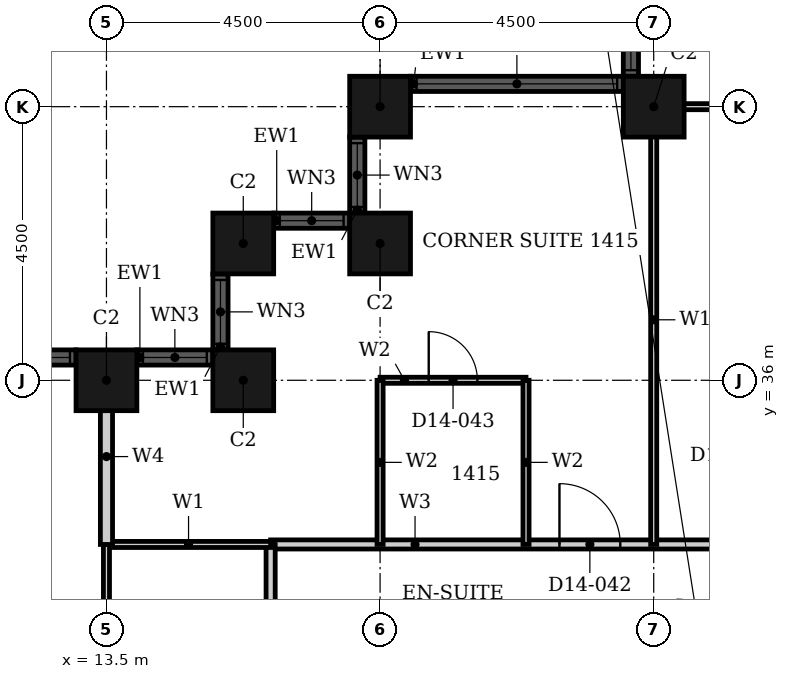
"""IFC4 building model, lengths in metres.
Left out: names, types, materials, properties, quantities, classifications, styles, units other than length and angle.
Written with IfcOpenShell. Run it as: python <this file> out.ifc"""

import sys

from ifc_helpers import new_model, si_unit, direction, frame, frame_2d, origin, origin_2d, place, context, subcontext, project, spatial, rectangle, hollow_rectangle, extrude, element, fill, save


model = new_model("IFC4")
c1 = context("Model", 3, precision=1e-05, world=origin(), true_north=direction((0.0, 1.0)))
c2 = subcontext(c1, "Body", "Model", "MODEL_VIEW")
j1 = project(units=[si_unit("LENGTHUNIT", "METRE"), si_unit("PLANEANGLEUNIT", "RADIAN")], contexts=[c1])
p1 = place(None, origin())
s1 = spatial("IfcSite", under=j1, at=p1, CompositionType="ELEMENT")
p2 = place(p1, origin())
s2 = spatial("IfcBuilding", under=s1, at=p2, CompositionType="ELEMENT")
p3 = place(p2, frame((0.0, 0.0, 63.6)))
s3 = spatial("IfcBuildingStorey", under=s2, at=p3, CompositionType="ELEMENT", Elevation=63.6)
for number, where, z_axis, x_axis in (
    (1, (22.5, 40.5, 0.0), (0.0, 0.0, 1.0), (1.0, 0.0, 0.0)),
    (2, (18.0, 40.5, 0.0), (0.0, 0.0, 1.0), (1.0, 0.0, 0.0)),
    (3, (18.0, 38.25, 0.0), (0.0, 0.0, 1.0), (1.0, 0.0, 0.0)),
    (4, (15.75, 38.25, 0.0), (0.0, 0.0, 1.0), (1.0, 0.0, 0.0)),
    (5, (15.75, 36.0, 0.0), (0.0, 0.0, 1.0), (1.0, 0.0, 0.0)),
    (6, (13.5, 36.0, 0.0), (0.0, 0.0, 1.0), (1.0, 0.0, 0.0)),
):
    element("IfcColumn", number, at=place(p3, frame(where, z_axis=z_axis, x_axis=x_axis)), inside=s3, PredefinedType="COLUMN", context=c2, shape_type="SweptSolid", body=[
        extrude(hollow_rectangle(XDim=1.0, YDim=1.0, WallThickness=0.032, at=origin_2d()), origin(), (0.0, 0.0, 1.0), 3.6),
    ])
p4 = place(p3, frame((22.125, 49.0, 0.0), z_axis=(0.0, 0.0, 1.0), x_axis=(0.0, -1.0, 0.0)))
e7 = element("IfcWall", 7, at=p4, inside=s3, PredefinedType="SOLIDWALL", context=c2, shape_type="SweptSolid", body=[
    extrude(rectangle(XDim=8.0, YDim=0.25, at=frame_2d((4.0, 0.0))), origin(), (0.0, 0.0, 1.0), 3.6),
])
p5 = place(p4, frame((0.1, 0.0, 0.9)))
e8 = element("IfcOpeningElement", 8, at=p5, cuts=e7, PredefinedType="OPENING", context=c2, shape_type="SweptSolid", body=[
    extrude(rectangle(XDim=3.3, YDim=2.08, at=frame_2d((1.65, 1.04))), frame((0.0, 0.135, 0.0), z_axis=(0.0, -1.0, 0.0), x_axis=(1.0, 0.0, 0.0)), (0.0, 0.0, 1.0), 0.27),
])
p6 = place(p4, frame((4.6, 0.0, 0.9)))
e9 = element("IfcOpeningElement", 9, at=p6, cuts=e7, PredefinedType="OPENING", context=c2, shape_type="SweptSolid", body=[
    extrude(rectangle(XDim=3.3, YDim=2.08, at=frame_2d((1.65, 1.04))), frame((0.0, 0.135, 0.0), z_axis=(0.0, -1.0, 0.0), x_axis=(1.0, 0.0, 0.0)), (0.0, 0.0, 1.0), 0.27),
])
p7 = place(p3, frame((22.0, 40.875, 0.0), z_axis=(0.0, 0.0, 1.0), x_axis=(-1.0, 0.0, 0.0)))
e10 = element("IfcWall", 10, at=p7, inside=s3, PredefinedType="SOLIDWALL", context=c2, shape_type="SweptSolid", body=[
    extrude(rectangle(XDim=3.5, YDim=0.25, at=frame_2d((1.75, 0.0))), origin(), (0.0, 0.0, 1.0), 3.6),
])
p8 = place(p7, frame((0.1, 0.0, 0.9)))
e11 = element("IfcOpeningElement", 11, at=p8, cuts=e10, PredefinedType="OPENING", context=c2, shape_type="SweptSolid", body=[
    extrude(rectangle(XDim=3.3, YDim=2.08, at=frame_2d((1.65, 1.04))), frame((0.0, 0.135, 0.0), z_axis=(0.0, -1.0, 0.0), x_axis=(1.0, 0.0, 0.0)), (0.0, 0.0, 1.0), 0.27),
])
p9 = place(p3, frame((17.625, 40.0, 0.0), z_axis=(0.0, 0.0, 1.0), x_axis=(0.0, -1.0, 0.0)))
e12 = element("IfcWall", 12, at=p9, inside=s3, PredefinedType="SOLIDWALL", context=c2, shape_type="SweptSolid", body=[
    extrude(rectangle(XDim=1.25, YDim=0.25, at=frame_2d((0.625, 0.0))), origin(), (0.0, 0.0, 1.0), 3.6),
])
p10 = place(p9, frame((0.1, 0.0, 0.9)))
e13 = element("IfcOpeningElement", 13, at=p10, cuts=e12, PredefinedType="OPENING", context=c2, shape_type="SweptSolid", body=[
    extrude(rectangle(XDim=1.05, YDim=2.08, at=frame_2d((0.525, 1.04))), frame((0.0, 0.135, 0.0), z_axis=(0.0, -1.0, 0.0), x_axis=(1.0, 0.0, 0.0)), (0.0, 0.0, 1.0), 0.27),
])
p11 = place(p3, frame((17.5, 38.625, 0.0), z_axis=(0.0, 0.0, 1.0), x_axis=(-1.0, 0.0, 0.0)))
e14 = element("IfcWall", 14, at=p11, inside=s3, PredefinedType="SOLIDWALL", context=c2, shape_type="SweptSolid", body=[
    extrude(rectangle(XDim=1.25, YDim=0.25, at=frame_2d((0.625, 0.0))), origin(), (0.0, 0.0, 1.0), 3.6),
])
p12 = place(p11, frame((0.1, 0.0, 0.9)))
e15 = element("IfcOpeningElement", 15, at=p12, cuts=e14, PredefinedType="OPENING", context=c2, shape_type="SweptSolid", body=[
    extrude(rectangle(XDim=1.05, YDim=2.08, at=frame_2d((0.525, 1.04))), frame((0.0, 0.135, 0.0), z_axis=(0.0, -1.0, 0.0), x_axis=(1.0, 0.0, 0.0)), (0.0, 0.0, 1.0), 0.27),
])
p13 = place(p3, frame((15.375, 37.75, 0.0), z_axis=(0.0, 0.0, 1.0), x_axis=(0.0, -1.0, 0.0)))
e16 = element("IfcWall", 16, at=p13, inside=s3, PredefinedType="SOLIDWALL", context=c2, shape_type="SweptSolid", body=[
    extrude(rectangle(XDim=1.25, YDim=0.25, at=frame_2d((0.625, 0.0))), origin(), (0.0, 0.0, 1.0), 3.6),
])
p14 = place(p13, frame((0.1, 0.0, 0.9)))
e17 = element("IfcOpeningElement", 17, at=p14, cuts=e16, PredefinedType="OPENING", context=c2, shape_type="SweptSolid", body=[
    extrude(rectangle(XDim=1.05, YDim=2.08, at=frame_2d((0.525, 1.04))), frame((0.0, 0.135, 0.0), z_axis=(0.0, -1.0, 0.0), x_axis=(1.0, 0.0, 0.0)), (0.0, 0.0, 1.0), 0.27),
])
p15 = place(p3, frame((15.25, 36.375, 0.0), z_axis=(0.0, 0.0, 1.0), x_axis=(-1.0, 0.0, 0.0)))
e18 = element("IfcWall", 18, at=p15, inside=s3, PredefinedType="SOLIDWALL", context=c2, shape_type="SweptSolid", body=[
    extrude(rectangle(XDim=1.25, YDim=0.25, at=frame_2d((0.625, 0.0))), origin(), (0.0, 0.0, 1.0), 3.6),
])
p16 = place(p15, frame((0.1, 0.0, 0.9)))
e19 = element("IfcOpeningElement", 19, at=p16, cuts=e18, PredefinedType="OPENING", context=c2, shape_type="SweptSolid", body=[
    extrude(rectangle(XDim=1.05, YDim=2.08, at=frame_2d((0.525, 1.04))), frame((0.0, 0.135, 0.0), z_axis=(0.0, -1.0, 0.0), x_axis=(1.0, 0.0, 0.0)), (0.0, 0.0, 1.0), 0.27),
])
p17 = place(p3, frame((13.0, 36.375, 0.0), z_axis=(0.0, 0.0, 1.0), x_axis=(-1.0, 0.0, 0.0)))
e20 = element("IfcWall", 20, at=p17, inside=s3, PredefinedType="SOLIDWALL", context=c2, shape_type="SweptSolid", body=[
    extrude(rectangle(XDim=8.0, YDim=0.25, at=frame_2d((4.0, 0.0))), origin(), (0.0, 0.0, 1.0), 3.6),
])
p18 = place(p17, frame((0.1, 0.0, 0.9)))
e21 = element("IfcOpeningElement", 21, at=p18, cuts=e20, PredefinedType="OPENING", context=c2, shape_type="SweptSolid", body=[
    extrude(rectangle(XDim=3.3, YDim=2.08, at=frame_2d((1.65, 1.04))), frame((0.0, 0.135, 0.0), z_axis=(0.0, -1.0, 0.0), x_axis=(1.0, 0.0, 0.0)), (0.0, 0.0, 1.0), 0.27),
])
p19 = place(p17, frame((4.6, 0.0, 0.9)))
e22 = element("IfcOpeningElement", 22, at=p19, cuts=e20, PredefinedType="OPENING", context=c2, shape_type="SweptSolid", body=[
    extrude(rectangle(XDim=3.3, YDim=2.08, at=frame_2d((1.65, 1.04))), frame((0.0, 0.135, 0.0), z_axis=(0.0, -1.0, 0.0), x_axis=(1.0, 0.0, 0.0)), (0.0, 0.0, 1.0), 0.27),
])
p20 = place(p3, frame((16.2, 33.3, 0.0), z_axis=(0.0, 0.0, 1.0), x_axis=(1.0, 0.0, 0.0)))
e23 = element("IfcWall", 23, at=p20, inside=s3, PredefinedType="PARTITIONING", context=c2, shape_type="SweptSolid", body=[
    extrude(rectangle(XDim=9.9, YDim=0.15, at=frame_2d((4.95, 0.0))), origin(), (0.0, 0.0, 1.0), 3.3),
])
p21 = place(p20, frame((4.75, 0.0, 0.0)))
e24 = element("IfcOpeningElement", 24, at=p21, cuts=e23, PredefinedType="OPENING", context=c2, shape_type="SweptSolid", body=[
    extrude(rectangle(XDim=1.0, YDim=2.1, at=frame_2d((0.5, 1.05))), frame((0.0, 0.085, 0.0), z_axis=(0.0, -1.0, 0.0), x_axis=(1.0, 0.0, 0.0)), (0.0, 0.0, 1.0), 0.17),
])
p22 = place(p20, frame((7.65, 0.0, 0.0)))
e25 = element("IfcOpeningElement", 25, at=p22, cuts=e23, PredefinedType="OPENING", context=c2, shape_type="SweptSolid", body=[
    extrude(rectangle(XDim=0.9, YDim=2.1, at=frame_2d((0.45, 1.05))), frame((0.0, 0.085, 0.0), z_axis=(0.0, -1.0, 0.0), x_axis=(1.0, 0.0, 0.0)), (0.0, 0.0, 1.0), 0.17),
])
p23 = place(p3, frame((16.2, 27.0, 0.0), z_axis=(0.0, 0.0, 1.0), x_axis=(0.0, 1.0, 0.0)))
e26 = element("IfcWall", 26, at=p23, inside=s3, PredefinedType="PARTITIONING", context=c2, shape_type="SweptSolid", body=[
    extrude(rectangle(XDim=6.3, YDim=0.15, at=frame_2d((3.15, 0.0))), origin(), (0.0, 0.0, 1.0), 3.3),
])
p24 = place(p23, frame((2.55, 0.0, 0.0)))
e27 = element("IfcOpeningElement", 27, at=p24, cuts=e26, PredefinedType="OPENING", context=c2, shape_type="SweptSolid", body=[
    extrude(rectangle(XDim=0.9, YDim=2.1, at=frame_2d((0.45, 1.05))), frame((0.0, 0.085, 0.0), z_axis=(0.0, -1.0, 0.0), x_axis=(1.0, 0.0, 0.0)), (0.0, 0.0, 1.0), 0.17),
])
p25 = place(p3, frame((13.5, 33.3, 0.0), z_axis=(0.0, 0.0, 1.0), x_axis=(1.0, 0.0, 0.0)))
e28 = element("IfcWall", 28, at=p25, inside=s3, PredefinedType="PARTITIONING", context=c2, shape_type="SweptSolid", body=[
    extrude(rectangle(XDim=2.7, YDim=0.1, at=frame_2d((1.35, 0.0))), origin(), (0.0, 0.0, 1.0), 3.3),
])
p26 = place(p3, frame((22.31, 40.5, 0.0), z_axis=(0.0, 0.0, 1.0), x_axis=(1.0, 0.0, 0.0)))
e29 = element("IfcWall", 29, at=p26, inside=s3, PredefinedType="PARTITIONING", context=c2, shape_type="SweptSolid", body=[
    extrude(rectangle(XDim=3.79, YDim=0.1, at=frame_2d((1.895, 0.0))), origin(), (0.0, 0.0, 1.0), 2.38),
])
p27 = place(p3, frame((13.5, 27.0, 0.0), z_axis=(0.0, 0.0, 1.0), x_axis=(0.0, 1.0, 0.0)))
e30 = element("IfcWall", 30, at=p27, inside=s3, PredefinedType="PARTITIONING", context=c2, shape_type="SweptSolid", body=[
    extrude(rectangle(XDim=6.3, YDim=0.1, at=frame_2d((3.15, 0.0))), origin(), (0.0, 0.0, 1.0), 2.38),
])
p28 = place(p3, frame((22.5, 33.3, 0.0), z_axis=(0.0, 0.0, 1.0), x_axis=(0.0, 1.0, 0.0)))
e31 = element("IfcWall", 31, at=p28, inside=s3, PredefinedType="PARTITIONING", context=c2, shape_type="SweptSolid", body=[
    extrude(rectangle(XDim=7.39, YDim=0.1, at=frame_2d((3.695, 0.0))), origin(), (0.0, 0.0, 1.0), 3.3),
])
p29 = place(p3, frame((13.5, 33.3, 0.0), z_axis=(0.0, 0.0, 1.0), x_axis=(0.0, 1.0, 0.0)))
e32 = element("IfcWall", 32, at=p29, inside=s3, PredefinedType="PARTITIONING", context=c2, shape_type="SweptSolid", body=[
    extrude(rectangle(XDim=2.89, YDim=0.2, at=frame_2d((1.445, 0.0))), origin(), (0.0, 0.0, 1.0), 2.38),
])
p30 = place(p3, frame((18.0, 36.0, 0.0), z_axis=(0.0, 0.0, 1.0), x_axis=(1.0, 0.0, 0.0)))
e33 = element("IfcWall", 33, at=p30, inside=s3, PredefinedType="PARTITIONING", context=c2, shape_type="SweptSolid", body=[
    extrude(rectangle(XDim=2.4, YDim=0.1, at=frame_2d((1.2, 0.0))), origin(), (0.0, 0.0, 1.0), 3.3),
])
p31 = place(p30, frame((0.8, 0.0, 0.0)))
e34 = element("IfcOpeningElement", 34, at=p31, cuts=e33, PredefinedType="OPENING", context=c2, shape_type="SweptSolid", body=[
    extrude(rectangle(XDim=0.8, YDim=2.1, at=frame_2d((0.4, 1.05))), frame((0.0, 0.06, 0.0), z_axis=(0.0, -1.0, 0.0), x_axis=(1.0, 0.0, 0.0)), (0.0, 0.0, 1.0), 0.12),
])
for number, where, z_axis, x_axis in (
    (35, (18.0, 33.3, 0.0), (0.0, 0.0, 1.0), (0.0, 1.0, 0.0)),
    (36, (20.4, 33.3, 0.0), (0.0, 0.0, 1.0), (0.0, 1.0, 0.0)),
):
    element("IfcWall", number, at=place(p3, frame(where, z_axis=z_axis, x_axis=x_axis)), inside=s3, PredefinedType="PARTITIONING", context=c2, shape_type="SweptSolid", body=[
        extrude(rectangle(XDim=2.7, YDim=0.1, at=frame_2d((1.35, 0.0))), origin(), (0.0, 0.0, 1.0), 3.3),
    ])
p32 = place(p6, origin())
e37 = element("IfcWindow", 37, at=p32, inside=s3, PartitioningType="SINGLE_PANEL", PredefinedType="WINDOW", context=c2, shape_type="SweptSolid", body=[
    extrude(rectangle(XDim=3.3, YDim=2.08, at=frame_2d((1.65, 1.04))), frame((0.0, 0.03, 0.0), z_axis=(0.0, -1.0, 0.0), x_axis=(1.0, 0.0, 0.0)), (0.0, 0.0, 1.0), 0.06),
])
fill(e9, e37)
p33 = place(p8, origin())
e38 = element("IfcWindow", 38, at=p33, inside=s3, PartitioningType="SINGLE_PANEL", PredefinedType="WINDOW", context=c2, shape_type="SweptSolid", body=[
    extrude(rectangle(XDim=3.3, YDim=2.08, at=frame_2d((1.65, 1.04))), frame((0.0, 0.03, 0.0), z_axis=(0.0, -1.0, 0.0), x_axis=(1.0, 0.0, 0.0)), (0.0, 0.0, 1.0), 0.06),
])
fill(e11, e38)
p34 = place(p10, origin())
e39 = element("IfcWindow", 39, at=p34, inside=s3, PartitioningType="SINGLE_PANEL", PredefinedType="WINDOW", context=c2, shape_type="SweptSolid", body=[
    extrude(rectangle(XDim=1.05, YDim=2.08, at=frame_2d((0.525, 1.04))), frame((0.0, 0.03, 0.0), z_axis=(0.0, -1.0, 0.0), x_axis=(1.0, 0.0, 0.0)), (0.0, 0.0, 1.0), 0.06),
])
fill(e13, e39)
p35 = place(p12, origin())
e40 = element("IfcWindow", 40, at=p35, inside=s3, PartitioningType="SINGLE_PANEL", PredefinedType="WINDOW", context=c2, shape_type="SweptSolid", body=[
    extrude(rectangle(XDim=1.05, YDim=2.08, at=frame_2d((0.525, 1.04))), frame((0.0, 0.03, 0.0), z_axis=(0.0, -1.0, 0.0), x_axis=(1.0, 0.0, 0.0)), (0.0, 0.0, 1.0), 0.06),
])
fill(e15, e40)
p36 = place(p14, origin())
e41 = element("IfcWindow", 41, at=p36, inside=s3, PartitioningType="SINGLE_PANEL", PredefinedType="WINDOW", context=c2, shape_type="SweptSolid", body=[
    extrude(rectangle(XDim=1.05, YDim=2.08, at=frame_2d((0.525, 1.04))), frame((0.0, 0.03, 0.0), z_axis=(0.0, -1.0, 0.0), x_axis=(1.0, 0.0, 0.0)), (0.0, 0.0, 1.0), 0.06),
])
fill(e17, e41)
p37 = place(p16, origin())
e42 = element("IfcWindow", 42, at=p37, inside=s3, PartitioningType="SINGLE_PANEL", PredefinedType="WINDOW", context=c2, shape_type="SweptSolid", body=[
    extrude(rectangle(XDim=1.05, YDim=2.08, at=frame_2d((0.525, 1.04))), frame((0.0, 0.03, 0.0), z_axis=(0.0, -1.0, 0.0), x_axis=(1.0, 0.0, 0.0)), (0.0, 0.0, 1.0), 0.06),
])
fill(e19, e42)
p38 = place(p18, origin())
e43 = element("IfcWindow", 43, at=p38, inside=s3, PartitioningType="SINGLE_PANEL", PredefinedType="WINDOW", context=c2, shape_type="SweptSolid", body=[
    extrude(rectangle(XDim=3.3, YDim=2.08, at=frame_2d((1.65, 1.04))), frame((0.0, 0.03, 0.0), z_axis=(0.0, -1.0, 0.0), x_axis=(1.0, 0.0, 0.0)), (0.0, 0.0, 1.0), 0.06),
])
fill(e21, e43)
p39 = place(p21, origin())
e44 = element("IfcDoor", 44, at=p39, inside=s3, OperationType="SINGLE_SWING_RIGHT", PredefinedType="DOOR", context=c2, shape_type="SweptSolid", body=[
    extrude(rectangle(XDim=1.0, YDim=2.1, at=frame_2d((0.5, 1.05))), frame((0.0, 0.025, 0.0), z_axis=(0.0, -1.0, 0.0), x_axis=(1.0, 0.0, 0.0)), (0.0, 0.0, 1.0), 0.05),
])
fill(e24, e44)
p40 = place(p31, origin())
e45 = element("IfcDoor", 45, at=p40, inside=s3, OperationType="SINGLE_SWING_RIGHT", PredefinedType="DOOR", context=c2, shape_type="SweptSolid", body=[
    extrude(rectangle(XDim=0.8, YDim=2.1, at=frame_2d((0.4, 1.05))), frame((0.0, 0.025, 0.0), z_axis=(0.0, -1.0, 0.0), x_axis=(1.0, 0.0, 0.0)), (0.0, 0.0, 1.0), 0.05),
])
fill(e34, e45)
save(model, sys.argv[1])
